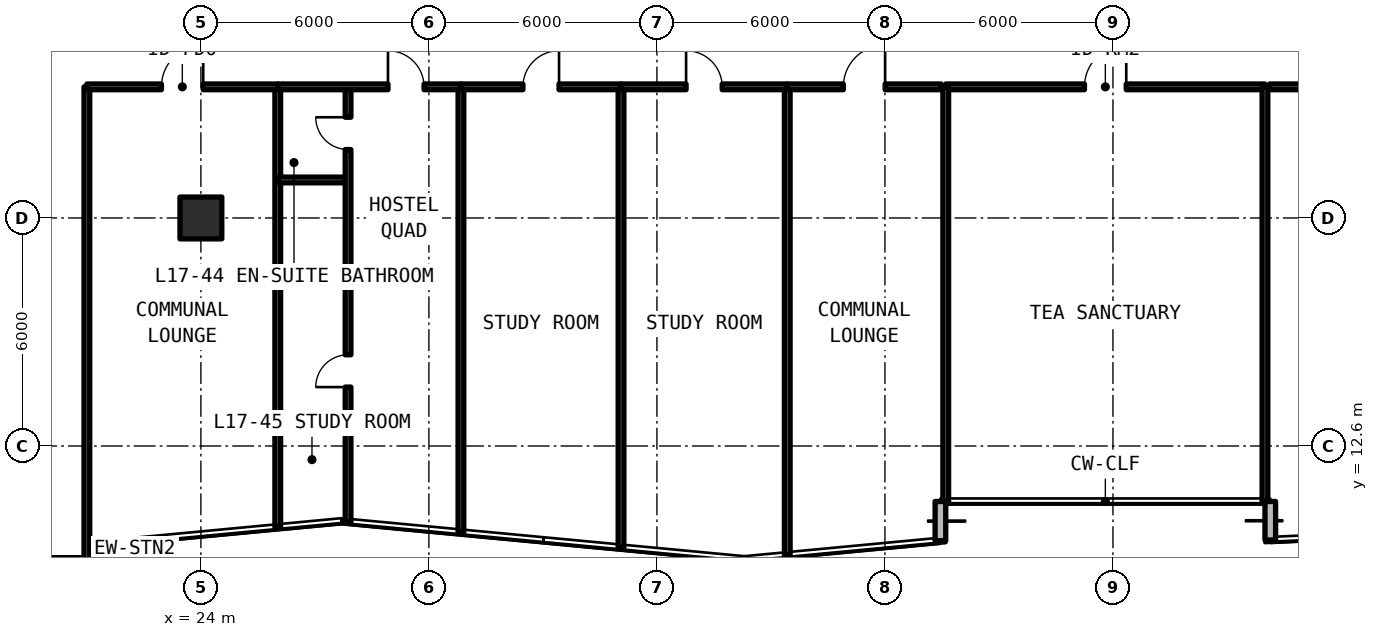
"""IFC4 building model, lengths in metres.
Left out: names, types, materials, properties, quantities, classifications, styles, units other than length and angle.
Written with IfcOpenShell. Run it as: python <this file> out.ifc"""

import sys

from ifc_helpers import new_model, si_unit, direction, frame, frame_2d, origin, origin_2d, place, context, subcontext, project, spatial, rectangle, extrude, element, fill, save


model = new_model("IFC4")
c1 = context("Model", 3, precision=1e-05, world=origin(), true_north=direction((0.0, 1.0)))
c2 = subcontext(c1, "Body", "Model", "MODEL_VIEW")
j1 = project(units=[si_unit("LENGTHUNIT", "METRE"), si_unit("PLANEANGLEUNIT", "RADIAN")], contexts=[c1])
p1 = place(None, origin())
s1 = spatial("IfcSite", under=j1, at=p1, CompositionType="ELEMENT")
p2 = place(p1, origin())
s2 = spatial("IfcBuilding", under=s1, at=p2, CompositionType="ELEMENT")
p3 = place(p2, frame((0.0, 0.0, 62.37)))
s3 = spatial("IfcBuildingStorey", under=s2, at=p3, CompositionType="ELEMENT", Elevation=62.37)
p4 = place(p3, frame((24.0, 18.6, 0.0), z_axis=(0.0, 0.0, 1.0), x_axis=(1.0, 0.0, 0.0)))
e1 = element("IfcColumn", 1, at=p4, inside=s3, PredefinedType="COLUMN", context=c2, shape_type="SweptSolid", body=[
    extrude(rectangle(XDim=1.1, YDim=1.1, at=origin_2d()), origin(), (0.0, 0.0, 1.0), 3.63),
])
p5 = place(p3, frame((22.26, 7.74, 0.0), z_axis=(0.0, 0.0, 1.0), x_axis=(0.0, 1.0, 0.0)))
e2 = element("IfcWall", 2, at=p5, inside=s3, PredefinedType="SOLIDWALL", context=c2, shape_type="SweptSolid", body=[
    extrude(rectangle(XDim=2.367, YDim=0.28, at=frame_2d((1.184, 0.0))), origin(), (0.0, 0.0, 1.0), 3.41),
])
p6 = place(p5, frame((0.759, 0.0, 0.78)))
e3 = element("IfcOpeningElement", 3, at=p6, cuts=e2, PredefinedType="OPENING", context=c2, shape_type="SweptSolid", body=[
    extrude(rectangle(XDim=0.85, YDim=1.65, at=frame_2d((0.425, 0.825))), frame((0.0, 0.15, 0.0), z_axis=(0.0, -1.0, 0.0), x_axis=(1.0, 0.0, 0.0)), (0.0, 0.0, 1.0), 0.3),
])
p7 = place(p3, frame((43.46, 10.107, 0.0), z_axis=(0.0, 0.0, 1.0), x_axis=(0.0, 1.0, 0.0)))
e4 = element("IfcWall", 4, at=p7, inside=s3, PredefinedType="SOLIDWALL", context=c2, shape_type="SweptSolid", body=[
    extrude(rectangle(XDim=1.032, YDim=0.28, at=frame_2d((0.516, 0.0))), origin(), (0.0, 0.0, 1.0), 3.41),
])
p8 = place(p3, frame((52.14, 11.14, 0.0), z_axis=(0.0, 0.0, 1.0), x_axis=(0.0, -1.0, 0.0)))
e5 = element("IfcWall", 5, at=p8, inside=s3, PredefinedType="SOLIDWALL", context=c2, shape_type="SweptSolid", body=[
    extrude(rectangle(XDim=1.013, YDim=0.28, at=frame_2d((0.507, 0.0))), origin(), (0.0, 0.0, 1.0), 3.41),
])
p9 = place(p3, frame((16.74, 11.858, 0.0), z_axis=(0.0, 0.0, 1.0), x_axis=(0.707106781187, -0.707106781187, 0.0)))
e6 = element("IfcWall", 6, at=p9, inside=s3, PredefinedType="SOLIDWALL", context=c2, shape_type="SweptSolid", body=[
    extrude(rectangle(XDim=5.824, YDim=0.28, at=frame_2d((2.912, 0.0))), origin(), (0.0, 0.0, 1.0), 3.41),
])
p10 = place(p9, frame((1.212, 0.0, 0.78)))
e7 = element("IfcOpeningElement", 7, at=p10, cuts=e6, PredefinedType="OPENING", context=c2, shape_type="SweptSolid", body=[
    extrude(rectangle(XDim=3.4, YDim=1.66, at=frame_2d((1.7, 0.83))), frame((0.0, 0.15, 0.0), z_axis=(0.0, -1.0, 0.0), x_axis=(1.0, 0.0, 0.0)), (0.0, 0.0, 1.0), 0.3),
])
p11 = place(p3, frame((43.6, 22.05, 0.0), z_axis=(0.0, 0.0, 1.0), x_axis=(1.0, 0.0, 0.0)))
e8 = element("IfcWall", 8, at=p11, inside=s3, PredefinedType="SOLIDWALL", context=c2, shape_type="SweptSolid", body=[
    extrude(rectangle(XDim=8.4, YDim=0.15, at=frame_2d((4.2, 0.0))), origin(), (0.0, 0.0, 1.0), 2.63),
])
p12 = place(p11, frame((3.65, 0.0, 0.0)))
e9 = element("IfcOpeningElement", 9, at=p12, cuts=e8, PredefinedType="OPENING", context=c2, shape_type="SweptSolid", body=[
    extrude(rectangle(XDim=1.1, YDim=2.15, at=frame_2d((0.55, 1.075))), frame((0.0, 0.085, 0.0), z_axis=(0.0, -1.0, 0.0), x_axis=(1.0, 0.0, 0.0)), (0.0, 0.0, 1.0), 0.17),
])
for number, where, z_axis, x_axis in (
    (10, (43.6, 11.14, 0.0), (0.0, 0.0, 1.0), (0.0, 1.0, 0.0)),
    (11, (52.0, 11.14, 0.0), (0.0, 0.0, 1.0), (0.0, 1.0, 0.0)),
):
    element("IfcWall", number, at=place(p3, frame(where, z_axis=z_axis, x_axis=x_axis)), inside=s3, PredefinedType="SOLIDWALL", context=c2, shape_type="SweptSolid", body=[
        extrude(rectangle(XDim=10.91, YDim=0.15, at=frame_2d((5.455, 0.0))), origin(), (0.0, 0.0, 1.0), 2.63),
    ])
p13 = place(p3, frame((21.0, 7.74, 0.0), z_axis=(0.0, 0.0, 1.0), x_axis=(0.0, 1.0, 0.0)))
e12 = element("IfcWall", 12, at=p13, inside=s3, PredefinedType="SOLIDWALL", context=c2, shape_type="SweptSolid", body=[
    extrude(rectangle(XDim=14.31, YDim=0.15, at=frame_2d((7.155, 0.0))), origin(), (0.0, 0.0, 1.0), 2.63),
])
p14 = place(p3, frame((26.023, 10.462, 0.0), z_axis=(0.0, 0.0, 1.0), x_axis=(0.0, 1.0, 0.0)))
e13 = element("IfcWall", 13, at=p14, inside=s3, PredefinedType="SOLIDWALL", context=c2, shape_type="SweptSolid", body=[
    extrude(rectangle(XDim=11.588, YDim=0.15, at=frame_2d((5.794, 0.0))), origin(), (0.0, 0.0, 1.0), 2.63),
])
p15 = place(p3, frame((21.0, 22.05, 0.0), z_axis=(0.0, 0.0, 1.0), x_axis=(1.0, 0.0, 0.0)))
e14 = element("IfcWall", 14, at=p15, inside=s3, PredefinedType="SOLIDWALL", context=c2, shape_type="SweptSolid", body=[
    extrude(rectangle(XDim=5.023, YDim=0.15, at=frame_2d((2.511, 0.0))), origin(), (0.0, 0.0, 1.0), 2.63),
])
p16 = place(p15, frame((1.961, 0.0, 0.0)))
e15 = element("IfcOpeningElement", 15, at=p16, cuts=e14, PredefinedType="OPENING", context=c2, shape_type="SweptSolid", body=[
    extrude(rectangle(XDim=1.1, YDim=2.15, at=frame_2d((0.55, 1.075))), frame((0.0, 0.085, 0.0), z_axis=(0.0, -1.0, 0.0), x_axis=(1.0, 0.0, 0.0)), (0.0, 0.0, 1.0), 0.17),
])
p17 = place(p3, frame((30.843, 10.324, 0.0), z_axis=(0.0, 0.0, 1.0), x_axis=(0.0, 1.0, 0.0)))
e16 = element("IfcWall", 16, at=p17, inside=s3, PredefinedType="SOLIDWALL", context=c2, shape_type="SweptSolid", body=[
    extrude(rectangle(XDim=11.726, YDim=0.15, at=frame_2d((5.863, 0.0))), origin(), (0.0, 0.0, 1.0), 2.63),
])
p18 = place(p3, frame((26.023, 19.6, 0.0), z_axis=(0.0, 0.0, 1.0), x_axis=(1.0, 0.0, 0.0)))
e17 = element("IfcWall", 17, at=p18, inside=s3, PredefinedType="PARTITIONING", context=c2, shape_type="SweptSolid", body=[
    extrude(rectangle(XDim=1.85, YDim=0.15, at=frame_2d((0.925, 0.0))), origin(), (0.0, 0.0, 1.0), 2.63),
])
p19 = place(p3, frame((27.873, 10.604, 0.0), z_axis=(0.0, 0.0, 1.0), x_axis=(0.0, 1.0, 0.0)))
e18 = element("IfcWall", 18, at=p19, inside=s3, PredefinedType="PARTITIONING", context=c2, shape_type="SweptSolid", body=[
    extrude(rectangle(XDim=11.446, YDim=0.15, at=frame_2d((5.723, 0.0))), origin(), (0.0, 0.0, 1.0), 2.63),
])
p20 = place(p19, frame((3.546, 0.0, 0.0)))
e19 = element("IfcOpeningElement", 19, at=p20, cuts=e18, PredefinedType="OPENING", context=c2, shape_type="SweptSolid", body=[
    extrude(rectangle(XDim=0.85, YDim=2.1, at=frame_2d((0.425, 1.05))), frame((0.0, 0.085, 0.0), z_axis=(0.0, -1.0, 0.0), x_axis=(1.0, 0.0, 0.0)), (0.0, 0.0, 1.0), 0.17),
])
p21 = place(p19, frame((9.796, 0.0, 0.0)))
e20 = element("IfcOpeningElement", 20, at=p21, cuts=e18, PredefinedType="OPENING", context=c2, shape_type="SweptSolid", body=[
    extrude(rectangle(XDim=0.85, YDim=2.1, at=frame_2d((0.425, 1.05))), frame((0.0, 0.085, 0.0), z_axis=(0.0, -1.0, 0.0), x_axis=(1.0, 0.0, 0.0)), (0.0, 0.0, 1.0), 0.17),
])
p22 = place(p3, frame((26.023, 22.05, 0.0), z_axis=(0.0, 0.0, 1.0), x_axis=(1.0, 0.0, 0.0)))
e21 = element("IfcWall", 21, at=p22, inside=s3, PredefinedType="SOLIDWALL", context=c2, shape_type="SweptSolid", body=[
    extrude(rectangle(XDim=4.82, YDim=0.15, at=frame_2d((2.41, 0.0))), origin(), (0.0, 0.0, 1.0), 2.63),
])
p23 = place(p22, frame((2.9, 0.0, 0.0)))
e22 = element("IfcOpeningElement", 22, at=p23, cuts=e21, PredefinedType="OPENING", context=c2, shape_type="SweptSolid", body=[
    extrude(rectangle(XDim=0.95, YDim=2.15, at=frame_2d((0.475, 1.075))), frame((0.0, 0.085, 0.0), z_axis=(0.0, -1.0, 0.0), x_axis=(1.0, 0.0, 0.0)), (0.0, 0.0, 1.0), 0.17),
])
p24 = place(p3, frame((35.055, 9.927, 0.0), z_axis=(0.0, 0.0, 1.0), x_axis=(0.0, 1.0, 0.0)))
e23 = element("IfcWall", 23, at=p24, inside=s3, PredefinedType="SOLIDWALL", context=c2, shape_type="SweptSolid", body=[
    extrude(rectangle(XDim=12.123, YDim=0.15, at=frame_2d((6.062, 0.0))), origin(), (0.0, 0.0, 1.0), 2.63),
])
p25 = place(p3, frame((30.843, 22.05, 0.0), z_axis=(0.0, 0.0, 1.0), x_axis=(1.0, 0.0, 0.0)))
e24 = element("IfcWall", 24, at=p25, inside=s3, PredefinedType="SOLIDWALL", context=c2, shape_type="SweptSolid", body=[
    extrude(rectangle(XDim=4.213, YDim=0.15, at=frame_2d((2.106, 0.0))), origin(), (0.0, 0.0, 1.0), 2.63),
])
p26 = place(p25, frame((1.631, 0.0, 0.0)))
e25 = element("IfcOpeningElement", 25, at=p26, cuts=e24, PredefinedType="OPENING", context=c2, shape_type="SweptSolid", body=[
    extrude(rectangle(XDim=0.95, YDim=2.15, at=frame_2d((0.475, 1.075))), frame((0.0, 0.085, 0.0), z_axis=(0.0, -1.0, 0.0), x_axis=(1.0, 0.0, 0.0)), (0.0, 0.0, 1.0), 0.17),
])
p27 = place(p3, frame((39.43, 9.727, 0.0), z_axis=(0.0, 0.0, 1.0), x_axis=(0.0, 1.0, 0.0)))
e26 = element("IfcWall", 26, at=p27, inside=s3, PredefinedType="SOLIDWALL", context=c2, shape_type="SweptSolid", body=[
    extrude(rectangle(XDim=12.323, YDim=0.15, at=frame_2d((6.161, 0.0))), origin(), (0.0, 0.0, 1.0), 2.63),
])
p28 = place(p3, frame((35.055, 22.05, 0.0), z_axis=(0.0, 0.0, 1.0), x_axis=(1.0, 0.0, 0.0)))
e27 = element("IfcWall", 27, at=p28, inside=s3, PredefinedType="SOLIDWALL", context=c2, shape_type="SweptSolid", body=[
    extrude(rectangle(XDim=4.375, YDim=0.15, at=frame_2d((2.187, 0.0))), origin(), (0.0, 0.0, 1.0), 2.63),
])
p29 = place(p28, frame((1.712, 0.0, 0.0)))
e28 = element("IfcOpeningElement", 28, at=p29, cuts=e27, PredefinedType="OPENING", context=c2, shape_type="SweptSolid", body=[
    extrude(rectangle(XDim=0.95, YDim=2.15, at=frame_2d((0.475, 1.075))), frame((0.0, 0.085, 0.0), z_axis=(0.0, -1.0, 0.0), x_axis=(1.0, 0.0, 0.0)), (0.0, 0.0, 1.0), 0.17),
])
p30 = place(p3, frame((39.43, 22.05, 0.0), z_axis=(0.0, 0.0, 1.0), x_axis=(1.0, 0.0, 0.0)))
e29 = element("IfcWall", 29, at=p30, inside=s3, PredefinedType="SOLIDWALL", context=c2, shape_type="SweptSolid", body=[
    extrude(rectangle(XDim=4.05, YDim=0.15, at=frame_2d((2.025, 0.0))), origin(), (0.0, 0.0, 1.0), 2.63),
])
p31 = place(p30, frame((1.475, 0.0, 0.0)))
e30 = element("IfcOpeningElement", 30, at=p31, cuts=e29, PredefinedType="OPENING", context=c2, shape_type="SweptSolid", body=[
    extrude(rectangle(XDim=1.1, YDim=2.15, at=frame_2d((0.55, 1.075))), frame((0.0, 0.085, 0.0), z_axis=(0.0, -1.0, 0.0), x_axis=(1.0, 0.0, 0.0)), (0.0, 0.0, 1.0), 0.17),
])
p32 = place(p3, frame((52.12, 22.05, 0.0), z_axis=(0.0, 0.0, 1.0), x_axis=(1.0, 0.0, 0.0)))
e31 = element("IfcWall", 31, at=p32, inside=s3, PredefinedType="SOLIDWALL", context=c2, shape_type="SweptSolid", body=[
    extrude(rectangle(XDim=6.769, YDim=0.15, at=frame_2d((3.384, 0.0))), origin(), (0.0, 0.0, 1.0), 2.63),
])
p33 = place(p32, frame((2.909, 0.0, 0.0)))
e32 = element("IfcOpeningElement", 32, at=p33, cuts=e31, PredefinedType="OPENING", context=c2, shape_type="SweptSolid", body=[
    extrude(rectangle(XDim=0.95, YDim=2.15, at=frame_2d((0.475, 1.075))), frame((0.0, 0.085, 0.0), z_axis=(0.0, -1.0, 0.0), x_axis=(1.0, 0.0, 0.0)), (0.0, 0.0, 1.0), 0.17),
])
p34 = place(p12, origin())
e33 = element("IfcDoor", 33, at=p34, inside=s3, OperationType="SINGLE_SWING_RIGHT", PredefinedType="DOOR", context=c2, shape_type="SweptSolid", body=[
    extrude(rectangle(XDim=1.1, YDim=2.15, at=frame_2d((0.55, 1.075))), frame((0.0, 0.025, 0.0), z_axis=(0.0, -1.0, 0.0), x_axis=(1.0, 0.0, 0.0)), (0.0, 0.0, 1.0), 0.05),
])
fill(e9, e33)
p35 = place(p16, origin())
e34 = element("IfcDoor", 34, at=p35, inside=s3, OperationType="SINGLE_SWING_RIGHT", PredefinedType="DOOR", context=c2, shape_type="SweptSolid", body=[
    extrude(rectangle(XDim=1.1, YDim=2.15, at=frame_2d((0.55, 1.075))), frame((0.0, 0.025, 0.0), z_axis=(0.0, -1.0, 0.0), x_axis=(1.0, 0.0, 0.0)), (0.0, 0.0, 1.0), 0.05),
])
fill(e15, e34)
p36 = place(p20, origin())
e35 = element("IfcDoor", 35, at=p36, inside=s3, OperationType="SINGLE_SWING_LEFT", PredefinedType="DOOR", context=c2, shape_type="SweptSolid", body=[
    extrude(rectangle(XDim=0.85, YDim=2.1, at=frame_2d((0.425, 1.05))), frame((0.0, 0.025, 0.0), z_axis=(0.0, -1.0, 0.0), x_axis=(1.0, 0.0, 0.0)), (0.0, 0.0, 1.0), 0.05),
])
fill(e19, e35)
p37 = place(p21, origin())
e36 = element("IfcDoor", 36, at=p37, inside=s3, OperationType="SINGLE_SWING_RIGHT", PredefinedType="DOOR", context=c2, shape_type="SweptSolid", body=[
    extrude(rectangle(XDim=0.85, YDim=2.1, at=frame_2d((0.425, 1.05))), frame((0.0, 0.025, 0.0), z_axis=(0.0, -1.0, 0.0), x_axis=(1.0, 0.0, 0.0)), (0.0, 0.0, 1.0), 0.05),
])
fill(e20, e36)
p38 = place(p23, origin())
e37 = element("IfcDoor", 37, at=p38, inside=s3, OperationType="SINGLE_SWING_LEFT", PredefinedType="DOOR", context=c2, shape_type="SweptSolid", body=[
    extrude(rectangle(XDim=0.95, YDim=2.15, at=frame_2d((0.475, 1.075))), frame((0.0, 0.025, 0.0), z_axis=(0.0, -1.0, 0.0), x_axis=(1.0, 0.0, 0.0)), (0.0, 0.0, 1.0), 0.05),
])
fill(e22, e37)
p39 = place(p26, origin())
e38 = element("IfcDoor", 38, at=p39, inside=s3, OperationType="SINGLE_SWING_RIGHT", PredefinedType="DOOR", context=c2, shape_type="SweptSolid", body=[
    extrude(rectangle(XDim=0.95, YDim=2.15, at=frame_2d((0.475, 1.075))), frame((0.0, 0.025, 0.0), z_axis=(0.0, -1.0, 0.0), x_axis=(1.0, 0.0, 0.0)), (0.0, 0.0, 1.0), 0.05),
])
fill(e25, e38)
p40 = place(p29, origin())
e39 = element("IfcDoor", 39, at=p40, inside=s3, OperationType="SINGLE_SWING_LEFT", PredefinedType="DOOR", context=c2, shape_type="SweptSolid", body=[
    extrude(rectangle(XDim=0.95, YDim=2.15, at=frame_2d((0.475, 1.075))), frame((0.0, 0.025, 0.0), z_axis=(0.0, -1.0, 0.0), x_axis=(1.0, 0.0, 0.0)), (0.0, 0.0, 1.0), 0.05),
])
fill(e28, e39)
p41 = place(p31, origin())
e40 = element("IfcDoor", 40, at=p41, inside=s3, OperationType="SINGLE_SWING_RIGHT", PredefinedType="DOOR", context=c2, shape_type="SweptSolid", body=[
    extrude(rectangle(XDim=1.1, YDim=2.15, at=frame_2d((0.55, 1.075))), frame((0.0, 0.025, 0.0), z_axis=(0.0, -1.0, 0.0), x_axis=(1.0, 0.0, 0.0)), (0.0, 0.0, 1.0), 0.05),
])
fill(e30, e40)
save(model, sys.argv[1])
